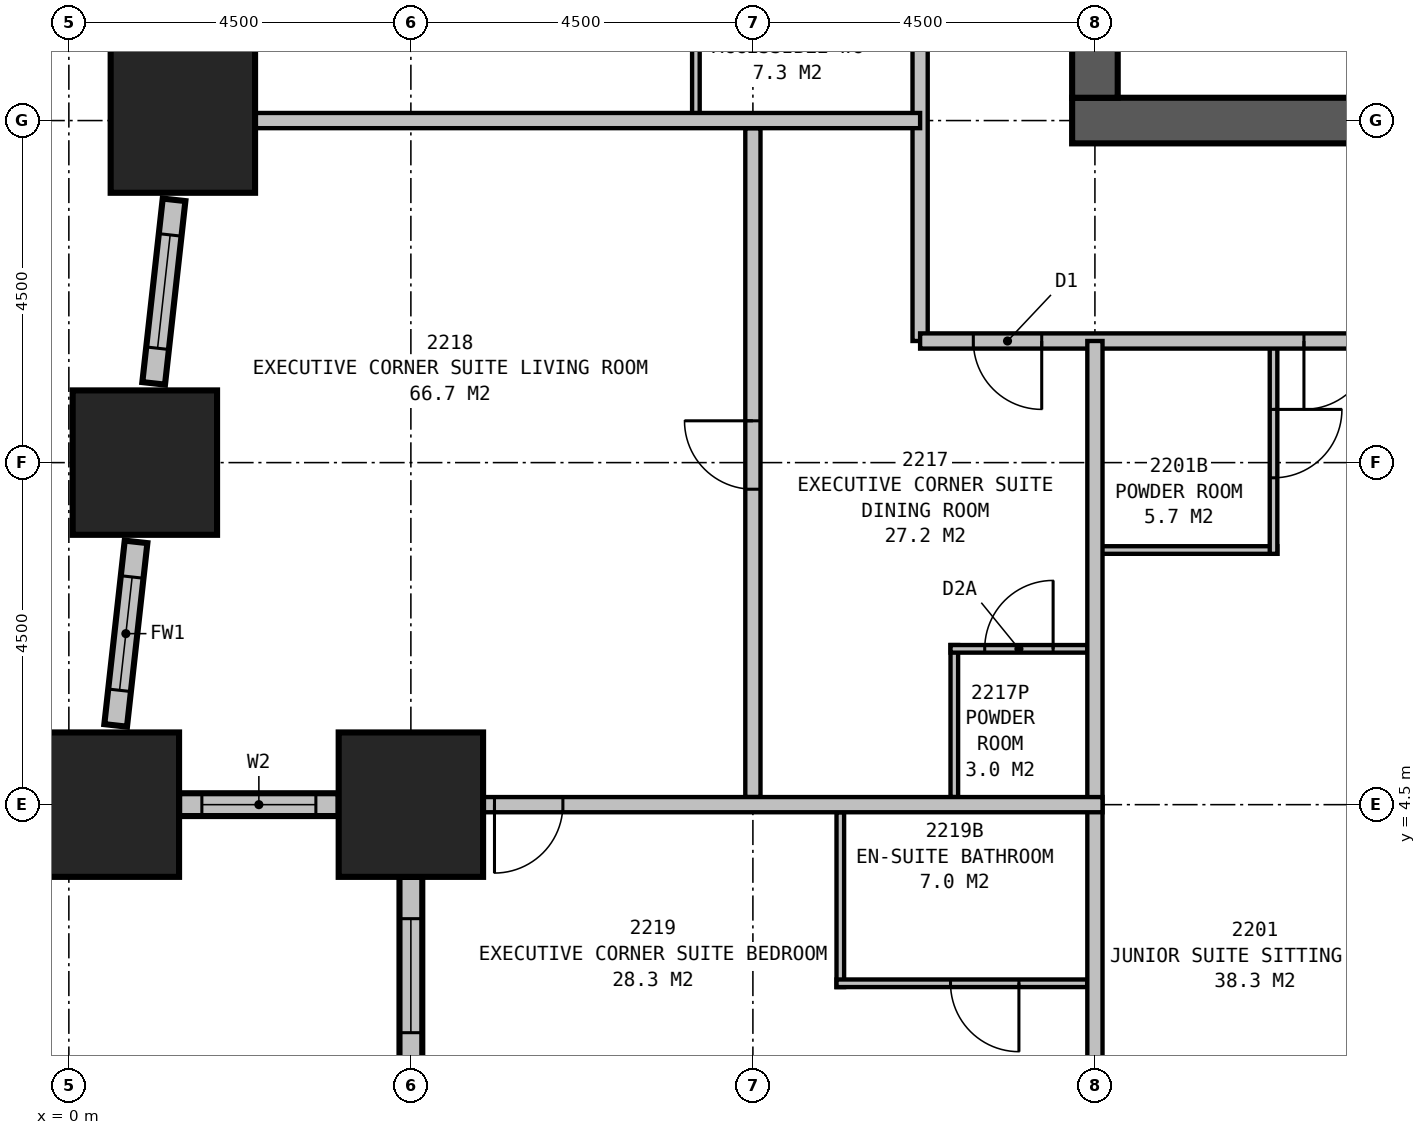
"""IFC4 building model, lengths in metres.
Left out: names, types, materials, properties, quantities, classifications, styles, units other than length and angle.
Written with IfcOpenShell. Run it as: python <this file> out.ifc"""

import sys

from ifc_helpers import new_model, si_unit, direction, frame, frame_2d, origin, origin_2d, place, context, subcontext, project, spatial, rectangle, extrude, element, fill, save


model = new_model("IFC4")
c1 = context("Model", 3, precision=1e-05, world=origin(), true_north=direction((0.0, 1.0)))
c2 = subcontext(c1, "Body", "Model", "MODEL_VIEW")
j1 = project(units=[si_unit("LENGTHUNIT", "METRE"), si_unit("PLANEANGLEUNIT", "RADIAN")], contexts=[c1])
p1 = place(None, origin())
s1 = spatial("IfcSite", under=j1, at=p1, CompositionType="ELEMENT")
p2 = place(p1, origin())
s2 = spatial("IfcBuilding", under=s1, at=p2, CompositionType="ELEMENT")
p3 = place(p2, frame((0.0, 0.0, 89.9)))
s3 = spatial("IfcBuildingStorey", under=s2, at=p3, CompositionType="ELEMENT", Elevation=89.9)
for number, where, z_axis, x_axis in (
    (1, (0.5, 4.5, 0.0), (0.0, 0.0, 1.0), (1.0, 0.0, 0.0)),
    (2, (4.5, 4.5, 0.0), (0.0, 0.0, 1.0), (1.0, 0.0, 0.0)),
    (3, (1.5, 13.5, 0.0), (0.0, 0.0, 1.0), (1.0, 0.0, 0.0)),
    (4, (1.0, 9.0, 0.0), (0.0, 0.0, 1.0), (1.0, 0.0, 0.0)),
):
    element("IfcColumn", number, at=place(p3, frame(where, z_axis=z_axis, x_axis=x_axis)), inside=s3, PredefinedType="COLUMN", context=c2, shape_type="SweptSolid", body=[
        extrude(rectangle(XDim=1.9, YDim=1.9, at=origin_2d()), origin(), (0.0, 0.0, 1.0), 3.5),
    ])
p4 = place(p3, frame((13.2, 13.5, 0.0), z_axis=(0.0, 0.0, 1.0), x_axis=(1.0, 0.0, 0.0)))
e5 = element("IfcWall", 5, at=p4, inside=s3, PredefinedType="SHEAR", context=c2, shape_type="SweptSolid", body=[
    extrude(rectangle(XDim=23.1, YDim=0.6, at=frame_2d((11.55, 0.0))), origin(), (0.0, 0.0, 1.0), 3.5),
])
p5 = place(p3, frame((13.5, 16.5, 0.0), z_axis=(0.0, 0.0, 1.0), x_axis=(0.0, -1.0, 0.0)))
e6 = element("IfcWall", 6, at=p5, inside=s3, PredefinedType="SHEAR", context=c2, shape_type="SweptSolid", body=[
    extrude(rectangle(XDim=2.7, YDim=0.6, at=frame_2d((1.35, 0.0))), origin(), (0.0, 0.0, 1.0), 3.5),
])
p6 = place(p3, frame((1.45, 4.5, 0.0), z_axis=(0.0, 0.0, 1.0), x_axis=(1.0, 0.0, 0.0)))
e7 = element("IfcWall", 7, at=p6, inside=s3, PredefinedType="STANDARD", context=c2, shape_type="SweptSolid", body=[
    extrude(rectangle(XDim=2.1, YDim=0.3, at=frame_2d((1.05, 0.0))), origin(), (0.0, 0.0, 1.0), 2.15),
])
p7 = place(p6, frame((0.3, 0.0, 0.5)))
e8 = element("IfcOpeningElement", 8, at=p7, cuts=e7, PredefinedType="OPENING", context=c2, shape_type="SweptSolid", body=[
    extrude(rectangle(XDim=1.5, YDim=1.5, at=frame_2d((0.75, 0.75))), frame((0.0, 0.16, 0.0), z_axis=(0.0, -1.0, 0.0), x_axis=(1.0, 0.0, 0.0)), (0.0, 0.0, 1.0), 0.32),
])
p8 = place(p3, frame((4.5, 3.55, 0.0), z_axis=(0.0, 0.0, 1.0), x_axis=(0.0, -1.0, 0.0)))
e9 = element("IfcWall", 9, at=p8, inside=s3, PredefinedType="STANDARD", context=c2, shape_type="SweptSolid", body=[
    extrude(rectangle(XDim=2.6, YDim=0.3, at=frame_2d((1.3, 0.0))), origin(), (0.0, 0.0, 1.0), 2.15),
])
p9 = place(p8, frame((0.55, 0.0, 0.5)))
e10 = element("IfcOpeningElement", 10, at=p9, cuts=e9, PredefinedType="OPENING", context=c2, shape_type="SweptSolid", body=[
    extrude(rectangle(XDim=1.5, YDim=1.5, at=frame_2d((0.75, 0.75))), frame((0.0, 0.16, 0.0), z_axis=(0.0, -1.0, 0.0), x_axis=(1.0, 0.0, 0.0)), (0.0, 0.0, 1.0), 0.32),
])
p10 = place(p3, frame((1.384, 12.457, 0.0), z_axis=(0.0, 0.0, 1.0), x_axis=(-0.110343286306, -0.993893535127, 0.0)))
e11 = element("IfcWall", 11, at=p10, inside=s3, PredefinedType="STANDARD", context=c2, shape_type="SweptSolid", body=[
    extrude(rectangle(XDim=2.429, YDim=0.3, at=frame_2d((1.215, 0.0))), origin(), (0.0, 0.0, 1.0), 2.15),
])
p11 = place(p10, frame((0.464, 0.0, 0.5)))
e12 = element("IfcOpeningElement", 12, at=p11, cuts=e11, PredefinedType="OPENING", context=c2, shape_type="SweptSolid", body=[
    extrude(rectangle(XDim=1.5, YDim=1.5, at=frame_2d((0.75, 0.75))), frame((0.0, 0.16, 0.0), z_axis=(0.0, -1.0, 0.0), x_axis=(1.0, 0.0, 0.0)), (0.0, 0.0, 1.0), 0.32),
])
p12 = place(p3, frame((0.884, 7.957, 0.0), z_axis=(0.0, 0.0, 1.0), x_axis=(-0.110343286306, -0.993893535127, 0.0)))
e13 = element("IfcWall", 13, at=p12, inside=s3, PredefinedType="STANDARD", context=c2, shape_type="SweptSolid", body=[
    extrude(rectangle(XDim=2.429, YDim=0.3, at=frame_2d((1.215, 0.0))), origin(), (0.0, 0.0, 1.0), 2.15),
])
p13 = place(p12, frame((0.465, 0.0, 0.5)))
e14 = element("IfcOpeningElement", 14, at=p13, cuts=e13, PredefinedType="OPENING", context=c2, shape_type="SweptSolid", body=[
    extrude(rectangle(XDim=1.5, YDim=1.5, at=frame_2d((0.75, 0.75))), frame((0.0, 0.16, 0.0), z_axis=(0.0, -1.0, 0.0), x_axis=(1.0, 0.0, 0.0)), (0.0, 0.0, 1.0), 0.32),
])
p14 = place(p3, frame((11.2, 10.6, 0.0), z_axis=(0.0, 0.0, 1.0), x_axis=(1.0, 0.0, 0.0)))
e15 = element("IfcWall", 15, at=p14, inside=s3, PredefinedType="PARTITIONING", context=c2, shape_type="SweptSolid", body=[
    extrude(rectangle(XDim=27.1, YDim=0.2, at=frame_2d((13.55, 0.0))), origin(), (0.0, 0.0, 1.0), 3.25),
])
p15 = place(p14, frame((5.95, 0.0, 0.0), z_axis=(0.0, 0.0, 1.0), x_axis=(-1.0, 0.0, 0.0)))
e16 = element("IfcOpeningElement", 16, at=p15, cuts=e15, PredefinedType="OPENING", context=c2, shape_type="SweptSolid", body=[
    extrude(rectangle(XDim=0.9, YDim=2.1, at=frame_2d((0.45, 1.05))), frame((0.0, 0.11, 0.0), z_axis=(0.0, -1.0, 0.0), x_axis=(1.0, 0.0, 0.0)), (0.0, 0.0, 1.0), 0.22),
])
p16 = place(p14, frame((13.2, 0.0, 0.0), z_axis=(0.0, 0.0, 1.0), x_axis=(-1.0, 0.0, 0.0)))
e17 = element("IfcOpeningElement", 17, at=p16, cuts=e15, PredefinedType="OPENING", context=c2, shape_type="SweptSolid", body=[
    extrude(rectangle(XDim=1.0, YDim=2.1, at=frame_2d((0.5, 1.05))), frame((0.0, 0.11, 0.0), z_axis=(0.0, -1.0, 0.0), x_axis=(1.0, 0.0, 0.0)), (0.0, 0.0, 1.0), 0.22),
])
p17 = place(p14, frame((20.0, 0.0, 0.0), z_axis=(0.0, 0.0, 1.0), x_axis=(-1.0, 0.0, 0.0)))
e18 = element("IfcOpeningElement", 18, at=p17, cuts=e15, PredefinedType="OPENING", context=c2, shape_type="SweptSolid", body=[
    extrude(rectangle(XDim=0.9, YDim=2.1, at=frame_2d((0.45, 1.05))), frame((0.0, 0.11, 0.0), z_axis=(0.0, -1.0, 0.0), x_axis=(1.0, 0.0, 0.0)), (0.0, 0.0, 1.0), 0.22),
])
p18 = place(p14, frame((1.6, 0.0, 0.0), z_axis=(0.0, 0.0, 1.0), x_axis=(-1.0, 0.0, 0.0)))
e19 = element("IfcOpeningElement", 19, at=p18, cuts=e15, PredefinedType="OPENING", context=c2, shape_type="SweptSolid", body=[
    extrude(rectangle(XDim=0.9, YDim=2.1, at=frame_2d((0.45, 1.05))), frame((0.0, 0.11, 0.0), z_axis=(0.0, -1.0, 0.0), x_axis=(1.0, 0.0, 0.0)), (0.0, 0.0, 1.0), 0.22),
])
p19 = place(p14, frame((26.4, 0.0, 0.0), z_axis=(0.0, 0.0, 1.0), x_axis=(-1.0, 0.0, 0.0)))
e20 = element("IfcOpeningElement", 20, at=p19, cuts=e15, PredefinedType="OPENING", context=c2, shape_type="SweptSolid", body=[
    extrude(rectangle(XDim=0.9, YDim=2.1, at=frame_2d((0.45, 1.05))), frame((0.0, 0.11, 0.0), z_axis=(0.0, -1.0, 0.0), x_axis=(1.0, 0.0, 0.0)), (0.0, 0.0, 1.0), 0.22),
])
p20 = place(p3, frame((11.2, 10.6, 0.0), z_axis=(0.0, 0.0, 1.0), x_axis=(0.0, 1.0, 0.0)))
e21 = element("IfcWall", 21, at=p20, inside=s3, PredefinedType="PARTITIONING", context=c2, shape_type="SweptSolid", body=[
    extrude(rectangle(XDim=19.3, YDim=0.2, at=frame_2d((9.65, 0.0))), origin(), (0.0, 0.0, 1.0), 3.25),
])
p21 = place(p20, frame((6.05, 0.0, 0.0)))
e22 = element("IfcOpeningElement", 22, at=p21, cuts=e21, PredefinedType="OPENING", context=c2, shape_type="SweptSolid", body=[
    extrude(rectangle(XDim=1.0, YDim=2.1, at=frame_2d((0.5, 1.05))), frame((0.0, 0.11, 0.0), z_axis=(0.0, -1.0, 0.0), x_axis=(1.0, 0.0, 0.0)), (0.0, 0.0, 1.0), 0.22),
])
p22 = place(p20, frame((10.15, 0.0, 0.0)))
e23 = element("IfcOpeningElement", 23, at=p22, cuts=e21, PredefinedType="OPENING", context=c2, shape_type="SweptSolid", body=[
    extrude(rectangle(XDim=0.9, YDim=2.1, at=frame_2d((0.45, 1.05))), frame((0.0, 0.11, 0.0), z_axis=(0.0, -1.0, 0.0), x_axis=(1.0, 0.0, 0.0)), (0.0, 0.0, 1.0), 0.22),
])
p23 = place(p3, frame((13.5, 7.85, 0.0), z_axis=(0.0, 0.0, 1.0), x_axis=(1.0, 0.0, 0.0)))
e24 = element("IfcWall", 24, at=p23, inside=s3, PredefinedType="PLUMBINGWALL", context=c2, shape_type="SweptSolid", body=[
    extrude(rectangle(XDim=2.4, YDim=0.1, at=frame_2d((1.2, 0.0))), origin(), (0.0, 0.0, 1.0), 3.25),
])
p24 = place(p3, frame((15.85, 10.6, 0.0), z_axis=(0.0, 0.0, 1.0), x_axis=(0.0, -1.0, 0.0)))
e25 = element("IfcWall", 25, at=p24, inside=s3, PredefinedType="PLUMBINGWALL", context=c2, shape_type="SweptSolid", body=[
    extrude(rectangle(XDim=2.8, YDim=0.1, at=frame_2d((1.4, 0.0))), origin(), (0.0, 0.0, 1.0), 3.25),
])
p25 = place(p24, frame((0.9, 0.0, 0.0)))
e26 = element("IfcOpeningElement", 26, at=p25, cuts=e25, PredefinedType="OPENING", context=c2, shape_type="SweptSolid", body=[
    extrude(rectangle(XDim=0.9, YDim=2.1, at=frame_2d((0.45, 1.05))), frame((0.0, 0.06, 0.0), z_axis=(0.0, -1.0, 0.0), x_axis=(1.0, 0.0, 0.0)), (0.0, 0.0, 1.0), 0.12),
])
p26 = place(p3, frame((8.25, 13.5, 0.0), z_axis=(0.0, 0.0, 1.0), x_axis=(0.0, 1.0, 0.0)))
e27 = element("IfcWall", 27, at=p26, inside=s3, PredefinedType="PLUMBINGWALL", context=c2, shape_type="SweptSolid", body=[
    extrude(rectangle(XDim=2.8, YDim=0.1, at=frame_2d((1.4, 0.0))), origin(), (0.0, 0.0, 1.0), 3.25),
])
p27 = place(p3, frame((11.2, 13.5, 0.0), z_axis=(0.0, 0.0, 1.0), x_axis=(-1.0, 0.0, 0.0)))
e28 = element("IfcWall", 28, at=p27, inside=s3, PredefinedType="PARTITIONING", context=c2, shape_type="SweptSolid", body=[
    extrude(rectangle(XDim=9.921, YDim=0.2, at=frame_2d((4.96, 0.0))), origin(), (0.0, 0.0, 1.0), 1.95),
])
p28 = place(p3, frame((13.5, 10.6, 0.0), z_axis=(0.0, 0.0, 1.0), x_axis=(0.0, -1.0, 0.0)))
e29 = element("IfcWall", 29, at=p28, inside=s3, PredefinedType="PARTITIONING", context=c2, shape_type="SweptSolid", body=[
    extrude(rectangle(XDim=10.6, YDim=0.2, at=frame_2d((5.3, 0.0))), origin(), (0.0, 0.0, 1.0), 2.25),
])
p29 = place(p3, frame((13.6, 4.5, 0.0), z_axis=(0.0, 0.0, 1.0), x_axis=(-1.0, 0.0, 0.0)))
e30 = element("IfcWall", 30, at=p29, inside=s3, PredefinedType="PARTITIONING", context=c2, shape_type="SweptSolid", body=[
    extrude(rectangle(XDim=9.1, YDim=0.2, at=frame_2d((4.55, 0.0))), origin(), (0.0, 0.0, 1.0), 3.25),
])
p30 = place(p29, frame((7.1, 0.0, 0.0)))
e31 = element("IfcOpeningElement", 31, at=p30, cuts=e30, PredefinedType="OPENING", context=c2, shape_type="SweptSolid", body=[
    extrude(rectangle(XDim=0.9, YDim=2.1, at=frame_2d((0.45, 1.05))), frame((0.0, 0.11, 0.0), z_axis=(0.0, -1.0, 0.0), x_axis=(1.0, 0.0, 0.0)), (0.0, 0.0, 1.0), 0.22),
])
p31 = place(p3, frame((9.0, 4.6, 0.0), z_axis=(0.0, 0.0, 1.0), x_axis=(0.0, 1.0, 0.0)))
e32 = element("IfcWall", 32, at=p31, inside=s3, PredefinedType="PARTITIONING", context=c2, shape_type="SweptSolid", body=[
    extrude(rectangle(XDim=8.8, YDim=0.2, at=frame_2d((4.4, 0.0))), origin(), (0.0, 0.0, 1.0), 2.25),
])
p32 = place(p31, frame((4.05, 0.0, 0.0)))
e33 = element("IfcOpeningElement", 33, at=p32, cuts=e32, PredefinedType="OPENING", context=c2, shape_type="SweptSolid", body=[
    extrude(rectangle(XDim=0.9, YDim=2.1, at=frame_2d((0.45, 1.05))), frame((0.0, 0.11, 0.0), z_axis=(0.0, -1.0, 0.0), x_axis=(1.0, 0.0, 0.0)), (0.0, 0.0, 1.0), 0.22),
])
p33 = place(p3, frame((11.65, 4.6, 0.0), z_axis=(0.0, 0.0, 1.0), x_axis=(0.0, 1.0, 0.0)))
e34 = element("IfcWall", 34, at=p33, inside=s3, PredefinedType="PLUMBINGWALL", context=c2, shape_type="SweptSolid", body=[
    extrude(rectangle(XDim=2.0, YDim=0.1, at=frame_2d((1.0, 0.0))), origin(), (0.0, 0.0, 1.0), 3.25),
])
p34 = place(p3, frame((13.4, 6.55, 0.0), z_axis=(0.0, 0.0, 1.0), x_axis=(-1.0, 0.0, 0.0)))
e35 = element("IfcWall", 35, at=p34, inside=s3, PredefinedType="PLUMBINGWALL", context=c2, shape_type="SweptSolid", body=[
    extrude(rectangle(XDim=1.8, YDim=0.1, at=frame_2d((0.9, 0.0))), origin(), (0.0, 0.0, 1.0), 3.25),
])
p35 = place(p34, frame((1.35, 0.0, 0.0), z_axis=(0.0, 0.0, 1.0), x_axis=(-1.0, 0.0, 0.0)))
e36 = element("IfcOpeningElement", 36, at=p35, cuts=e35, PredefinedType="OPENING", context=c2, shape_type="SweptSolid", body=[
    extrude(rectangle(XDim=0.9, YDim=2.1, at=frame_2d((0.45, 1.05))), frame((0.0, 0.06, 0.0), z_axis=(0.0, -1.0, 0.0), x_axis=(1.0, 0.0, 0.0)), (0.0, 0.0, 1.0), 0.12),
])
p36 = place(p3, frame((10.15, 4.4, 0.0), z_axis=(0.0, 0.0, 1.0), x_axis=(0.0, -1.0, 0.0)))
e37 = element("IfcWall", 37, at=p36, inside=s3, PredefinedType="PLUMBINGWALL", context=c2, shape_type="SweptSolid", body=[
    extrude(rectangle(XDim=2.3, YDim=0.1, at=frame_2d((1.15, 0.0))), origin(), (0.0, 0.0, 1.0), 3.25),
])
p37 = place(p3, frame((13.4, 2.15, 0.0), z_axis=(0.0, 0.0, 1.0), x_axis=(-1.0, 0.0, 0.0)))
e38 = element("IfcWall", 38, at=p37, inside=s3, PredefinedType="PLUMBINGWALL", context=c2, shape_type="SweptSolid", body=[
    extrude(rectangle(XDim=3.3, YDim=0.1, at=frame_2d((1.65, 0.0))), origin(), (0.0, 0.0, 1.0), 3.25),
])
p38 = place(p37, frame((0.9, 0.0, 0.0)))
e39 = element("IfcOpeningElement", 39, at=p38, cuts=e38, PredefinedType="OPENING", context=c2, shape_type="SweptSolid", body=[
    extrude(rectangle(XDim=0.9, YDim=2.1, at=frame_2d((0.45, 1.05))), frame((0.0, 0.06, 0.0), z_axis=(0.0, -1.0, 0.0), x_axis=(1.0, 0.0, 0.0)), (0.0, 0.0, 1.0), 0.12),
])
p39 = place(p7, origin())
e40 = element("IfcWindow", 40, at=p39, inside=s3, PartitioningType="SINGLE_PANEL", PredefinedType="WINDOW", context=c2, shape_type="SweptSolid", body=[
    extrude(rectangle(XDim=1.5, YDim=1.5, at=frame_2d((0.75, 0.75))), frame((0.0, 0.03, 0.0), z_axis=(0.0, -1.0, 0.0), x_axis=(1.0, 0.0, 0.0)), (0.0, 0.0, 1.0), 0.06),
])
fill(e8, e40)
p40 = place(p9, origin())
e41 = element("IfcWindow", 41, at=p40, inside=s3, PartitioningType="SINGLE_PANEL", PredefinedType="WINDOW", context=c2, shape_type="SweptSolid", body=[
    extrude(rectangle(XDim=1.5, YDim=1.5, at=frame_2d((0.75, 0.75))), frame((0.0, 0.03, 0.0), z_axis=(0.0, -1.0, 0.0), x_axis=(1.0, 0.0, 0.0)), (0.0, 0.0, 1.0), 0.06),
])
fill(e10, e41)
p41 = place(p11, origin())
e42 = element("IfcWindow", 42, at=p41, inside=s3, PartitioningType="SINGLE_PANEL", PredefinedType="WINDOW", context=c2, shape_type="SweptSolid", body=[
    extrude(rectangle(XDim=1.5, YDim=1.5, at=frame_2d((0.75, 0.75))), frame((0.0, 0.03, 0.0), z_axis=(0.0, -1.0, 0.0), x_axis=(1.0, 0.0, 0.0)), (0.0, 0.0, 1.0), 0.06),
])
fill(e12, e42)
p42 = place(p13, origin())
e43 = element("IfcWindow", 43, at=p42, inside=s3, PartitioningType="SINGLE_PANEL", PredefinedType="WINDOW", context=c2, shape_type="SweptSolid", body=[
    extrude(rectangle(XDim=1.5, YDim=1.5, at=frame_2d((0.75, 0.75))), frame((0.0, 0.03, 0.0), z_axis=(0.0, -1.0, 0.0), x_axis=(1.0, 0.0, 0.0)), (0.0, 0.0, 1.0), 0.06),
])
fill(e14, e43)
p43 = place(p15, origin())
e44 = element("IfcDoor", 44, at=p43, inside=s3, OperationType="SINGLE_SWING_RIGHT", PredefinedType="DOOR", context=c2, shape_type="SweptSolid", body=[
    extrude(rectangle(XDim=0.9, YDim=2.1, at=frame_2d((0.45, 1.05))), frame((0.0, 0.025, 0.0), z_axis=(0.0, -1.0, 0.0), x_axis=(1.0, 0.0, 0.0)), (0.0, 0.0, 1.0), 0.05),
])
fill(e16, e44)
p44 = place(p18, origin())
e45 = element("IfcDoor", 45, at=p44, inside=s3, OperationType="SINGLE_SWING_LEFT", PredefinedType="DOOR", context=c2, shape_type="SweptSolid", body=[
    extrude(rectangle(XDim=0.9, YDim=2.1, at=frame_2d((0.45, 1.05))), frame((0.0, 0.025, 0.0), z_axis=(0.0, -1.0, 0.0), x_axis=(1.0, 0.0, 0.0)), (0.0, 0.0, 1.0), 0.05),
])
fill(e19, e45)
p45 = place(p25, origin())
e46 = element("IfcDoor", 46, at=p45, inside=s3, OperationType="SINGLE_SWING_LEFT", PredefinedType="DOOR", context=c2, shape_type="SweptSolid", body=[
    extrude(rectangle(XDim=0.9, YDim=2.1, at=frame_2d((0.45, 1.05))), frame((0.0, 0.025, 0.0), z_axis=(0.0, -1.0, 0.0), x_axis=(1.0, 0.0, 0.0)), (0.0, 0.0, 1.0), 0.05),
])
fill(e26, e46)
p46 = place(p30, origin())
e47 = element("IfcDoor", 47, at=p46, inside=s3, OperationType="SINGLE_SWING_RIGHT", PredefinedType="DOOR", context=c2, shape_type="SweptSolid", body=[
    extrude(rectangle(XDim=0.9, YDim=2.1, at=frame_2d((0.45, 1.05))), frame((0.0, 0.025, 0.0), z_axis=(0.0, -1.0, 0.0), x_axis=(1.0, 0.0, 0.0)), (0.0, 0.0, 1.0), 0.05),
])
fill(e31, e47)
p47 = place(p32, origin())
e48 = element("IfcDoor", 48, at=p47, inside=s3, OperationType="SINGLE_SWING_RIGHT", PredefinedType="DOOR", context=c2, shape_type="SweptSolid", body=[
    extrude(rectangle(XDim=0.9, YDim=2.1, at=frame_2d((0.45, 1.05))), frame((0.0, 0.025, 0.0), z_axis=(0.0, -1.0, 0.0), x_axis=(1.0, 0.0, 0.0)), (0.0, 0.0, 1.0), 0.05),
])
fill(e33, e48)
p48 = place(p35, origin())
e49 = element("IfcDoor", 49, at=p48, inside=s3, OperationType="SINGLE_SWING_RIGHT", PredefinedType="DOOR", context=c2, shape_type="SweptSolid", body=[
    extrude(rectangle(XDim=0.9, YDim=2.1, at=frame_2d((0.45, 1.05))), frame((0.0, 0.025, 0.0), z_axis=(0.0, -1.0, 0.0), x_axis=(1.0, 0.0, 0.0)), (0.0, 0.0, 1.0), 0.05),
])
fill(e36, e49)
p49 = place(p38, origin())
e50 = element("IfcDoor", 50, at=p49, inside=s3, OperationType="SINGLE_SWING_LEFT", PredefinedType="DOOR", context=c2, shape_type="SweptSolid", body=[
    extrude(rectangle(XDim=0.9, YDim=2.1, at=frame_2d((0.45, 1.05))), frame((0.0, 0.025, 0.0), z_axis=(0.0, -1.0, 0.0), x_axis=(1.0, 0.0, 0.0)), (0.0, 0.0, 1.0), 0.05),
])
fill(e39, e50)
save(model, sys.argv[1])
